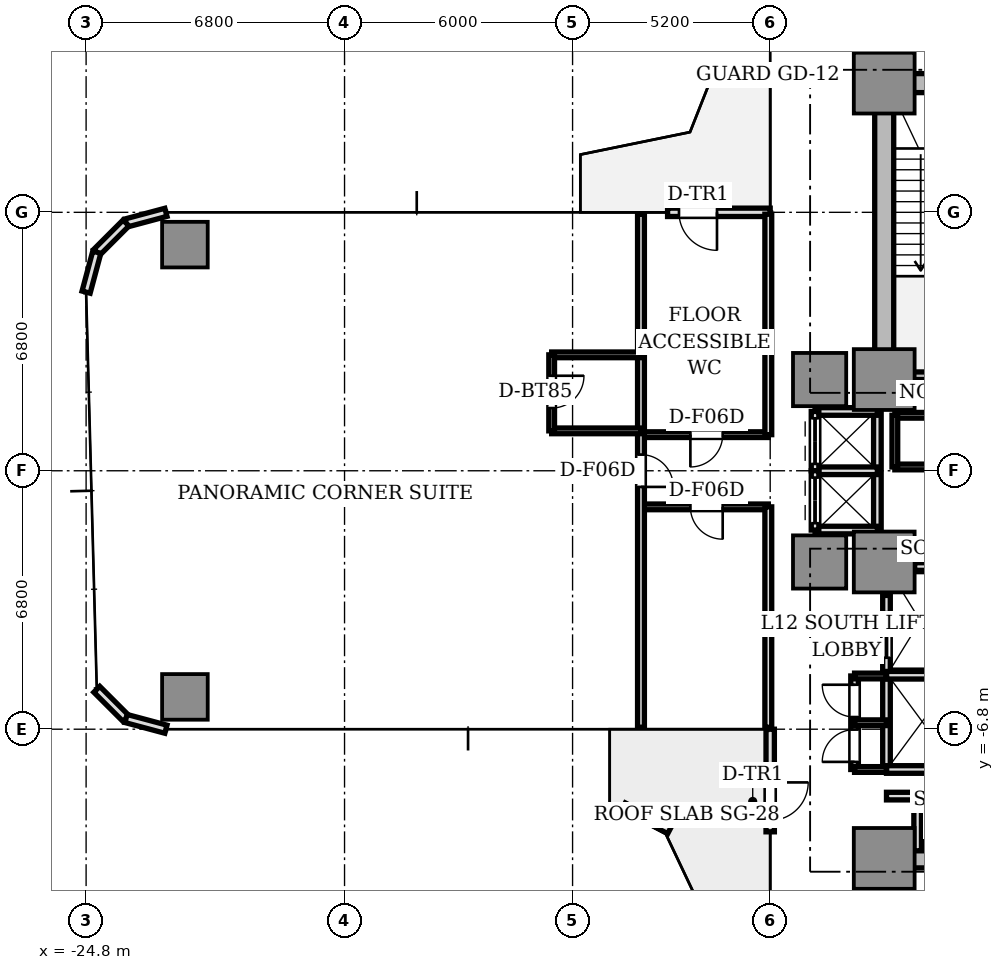
"""IFC4 building model, lengths in metres.
Left out: names, types, materials, properties, quantities, classifications, styles, units other than length and angle.
Written with IfcOpenShell. Run it as: python <this file> out.ifc"""

import sys

from ifc_helpers import new_model, si_unit, direction, frame, frame_2d, origin, origin_2d, place, context, subcontext, project, spatial, rectangle, extrude, source, transform, mapped, element, fill, save


model = new_model("IFC4")
c1 = context("Model", 3, precision=1e-05, world=origin(), true_north=direction((0.0, 1.0)))
c2 = subcontext(c1, "Body", "Model", "MODEL_VIEW")
j1 = project(units=[si_unit("LENGTHUNIT", "METRE"), si_unit("PLANEANGLEUNIT", "RADIAN")], contexts=[c1])
p1 = place(None, origin())
s1 = spatial("IfcSite", under=j1, at=p1, CompositionType="ELEMENT")
p2 = place(p1, origin())
s2 = spatial("IfcBuilding", under=s1, at=p2, CompositionType="ELEMENT")
p3 = place(p2, frame((0.0, 0.0, 46.55)))
s3 = spatial("IfcBuildingStorey", under=s2, at=p3, CompositionType="ELEMENT", Elevation=46.55)
p4 = place(p3, frame((-3.55, 10.2, 0.0), z_axis=(0.0, 0.0, 1.0), x_axis=(1.0, 0.0, 0.0)))
e1 = element("IfcWall", 1, at=p4, inside=s3, PredefinedType="SHEAR", context=c2, shape_type="SweptSolid", body=[
    extrude(rectangle(XDim=7.1, YDim=0.5, at=frame_2d((3.55, 0.0))), origin(), (0.0, 0.0, 1.0), 4.26),
])
p5 = place(p3, frame((-3.8, 2.85, 0.0), z_axis=(0.0, 0.0, 1.0), x_axis=(0.0, 1.0, 0.0)))
e2 = element("IfcWall", 2, at=p5, inside=s3, PredefinedType="SHEAR", context=c2, shape_type="SweptSolid", body=[
    extrude(rectangle(XDim=6.9, YDim=0.5, at=frame_2d((3.45, 0.0))), origin(), (0.0, 0.0, 1.0), 4.26),
])
p6 = place(p3, frame((-3.55, -10.2, 0.0), z_axis=(0.0, 0.0, 1.0), x_axis=(1.0, 0.0, 0.0)))
e3 = element("IfcWall", 3, at=p6, inside=s3, PredefinedType="SHEAR", context=c2, shape_type="SweptSolid", body=[
    extrude(rectangle(XDim=7.1, YDim=0.5, at=frame_2d((3.55, 0.0))), origin(), (0.0, 0.0, 1.0), 4.26),
])
m1 = source(origin(), c2, "Body", "SweptSolid", [
    extrude(rectangle(XDim=1.6, YDim=1.6, at=origin_2d()), origin(), (0.0, 0.0, 1.0), 4.26),
])
for number, where, z_axis, x_axis in (
    (4, (-3.8, 2.4, 0.0), (0.0, 0.0, 1.0), (1.0, 0.0, 0.0)),
    (5, (-3.8, 10.2, 0.0), (0.0, 0.0, 1.0), (1.0, 0.0, 0.0)),
    (6, (-3.8, -2.4, 0.0), (0.0, 0.0, 1.0), (1.0, 0.0, 0.0)),
    (7, (-3.8, -10.2, 0.0), (0.0, 0.0, 1.0), (1.0, 0.0, 0.0)),
):
    element("IfcColumn", number, at=place(p3, frame(where, z_axis=z_axis, x_axis=x_axis)), inside=s3, PredefinedType="COLUMN", context=c2, shape_type="MappedRepresentation", body=[
        mapped(m1, transform((0.0, 0.0, 0.0), scale=1.0)),
    ])
m2 = source(origin(), c2, "Body", "SweptSolid", [
    extrude(rectangle(XDim=1.4, YDim=1.4, at=origin_2d()), origin(), (0.0, 0.0, 1.0), 4.26),
])
for number, where, z_axis, x_axis in (
    (8, (-5.5, 2.4, 0.0), (0.0, 0.0, 1.0), (1.0, 0.0, 0.0)),
    (9, (-5.5, -2.4, 0.0), (0.0, 0.0, 1.0), (1.0, 0.0, 0.0)),
):
    element("IfcColumn", number, at=place(p3, frame(where, z_axis=z_axis, x_axis=x_axis)), inside=s3, PredefinedType="COLUMN", context=c2, shape_type="MappedRepresentation", body=[
        mapped(m2, transform((0.0, 0.0, 0.0), scale=1.0)),
    ])
m3 = source(origin(), c2, "Body", "SweptSolid", [
    extrude(rectangle(XDim=1.2, YDim=1.2, at=origin_2d()), origin(), (0.0, 0.0, 1.0), 4.26),
])
for number, where, z_axis, x_axis in (
    (10, (-22.2, 5.95, 0.0), (0.0, 0.0, 1.0), (1.0, 0.0, 0.0)),
    (11, (-22.2, -5.95, 0.0), (0.0, 0.0, 1.0), (1.0, 0.0, 0.0)),
):
    element("IfcColumn", number, at=place(p3, frame(where, z_axis=z_axis, x_axis=x_axis)), inside=s3, PredefinedType="COLUMN", context=c2, shape_type="MappedRepresentation", body=[
        mapped(m3, transform((0.0, 0.0, 0.0), scale=1.0)),
    ])
p7 = place(p3, frame((-6.8, 6.8, 0.0), z_axis=(0.0, 0.0, 1.0), x_axis=(-1.0, 0.0, 0.0)))
e12 = element("IfcWall", 12, at=p7, inside=s3, PredefinedType="STANDARD", context=c2, shape_type="SweptSolid", body=[
    extrude(rectangle(XDim=2.7, YDim=0.22, at=frame_2d((1.35, 0.0))), origin(), (0.0, 0.0, 1.0), 4.26),
])
p8 = place(p7, frame((1.4, 0.0, 0.0)))
e13 = element("IfcOpeningElement", 13, at=p8, cuts=e12, PredefinedType="OPENING", context=c2, shape_type="SweptSolid", body=[
    extrude(rectangle(XDim=1.0, YDim=2.2, at=frame_2d((0.5, 1.1))), frame((0.0, 0.12, 0.0), z_axis=(0.0, -1.0, 0.0), x_axis=(1.0, 0.0, 0.0)), (0.0, 0.0, 1.0), 0.24),
])
for number, where, z_axis, x_axis in (
    (14, (-22.7, 6.8, 0.0), (0.0, 0.0, 1.0), (-0.966, -0.259, 0.0)),
    (15, (-23.75, 6.519, 0.0), (0.0, 0.0, 1.0), (-0.707, -0.707, 0.0)),
    (16, (-24.519, 5.75, 0.0), (0.0, 0.0, 1.0), (-0.259, -0.966, 0.0)),
    (17, (-24.519, -5.75, 0.0), (0.0, 0.0, 1.0), (0.707, -0.707, 0.0)),
    (18, (-23.75, -6.519, 0.0), (0.0, 0.0, 1.0), (0.966, -0.259, 0.0)),
):
    element("IfcWall", number, at=place(p3, frame(where, z_axis=z_axis, x_axis=x_axis)), inside=s3, PredefinedType="STANDARD", context=c2, shape_type="SweptSolid", body=[
        extrude(rectangle(XDim=1.087, YDim=0.22, at=frame_2d((0.543, 0.0))), origin(), (0.0, 0.0, 1.0), 4.26),
    ])
p9 = place(p3, frame((-6.8, -6.8, 0.0), z_axis=(0.0, 0.0, 1.0), x_axis=(0.0, -1.0, 0.0)))
e19 = element("IfcWall", 19, at=p9, inside=s3, PredefinedType="STANDARD", context=c2, shape_type="SweptSolid", body=[
    extrude(rectangle(XDim=2.7, YDim=0.22, at=frame_2d((1.35, 0.0))), origin(), (0.0, 0.0, 1.0), 4.26),
])
p10 = place(p9, frame((1.4, 0.0, 0.0)))
e20 = element("IfcOpeningElement", 20, at=p10, cuts=e19, PredefinedType="OPENING", context=c2, shape_type="SweptSolid", body=[
    extrude(rectangle(XDim=1.0, YDim=2.2, at=frame_2d((0.5, 1.1))), frame((0.0, 0.12, 0.0), z_axis=(0.0, -1.0, 0.0), x_axis=(1.0, 0.0, 0.0)), (0.0, 0.0, 1.0), 0.24),
])
p11 = place(p3, frame((-10.658, -8.828, 0.0), z_axis=(0.0, 0.0, 1.0), x_axis=(0.886258866685, -0.463190264602, 0.0)))
e21 = element("IfcWall", 21, at=p11, inside=s3, PredefinedType="PARAPET", context=c2, shape_type="SweptSolid", body=[
    extrude(rectangle(XDim=1.363, YDim=0.2, at=frame_2d((0.682, 0.0))), origin(), (0.0, 0.0, 1.0), 0.65),
])
p12 = place(p3, frame((-3.72, 2.5, 0.0), z_axis=(0.0, 0.0, 1.0), x_axis=(1.0, 0.0, 0.0)))
e22 = element("IfcWall", 22, at=p12, inside=s3, PredefinedType="SOLIDWALL", context=c2, shape_type="SweptSolid", body=[
    extrude(rectangle(XDim=3.72, YDim=0.2, at=frame_2d((1.86, 0.0))), origin(), (0.0, 0.0, 1.0), 4.26),
])
p13 = place(p3, frame((-3.0, -2.52, 0.0), z_axis=(0.0, 0.0, 1.0), x_axis=(1.0, 0.0, 0.0)))
e23 = element("IfcWall", 23, at=p13, inside=s3, PredefinedType="SOLIDWALL", context=c2, shape_type="SweptSolid", body=[
    extrude(rectangle(XDim=1.0, YDim=0.2, at=frame_2d((0.5, 0.0))), origin(), (0.0, 0.0, 1.0), 3.81),
])
p14 = place(p3, frame((-3.74, -5.36, 0.0), z_axis=(0.0, 0.0, 1.0), x_axis=(0.0, 1.0, 0.0)))
e24 = element("IfcWall", 24, at=p14, inside=s3, PredefinedType="SOLIDWALL", context=c2, shape_type="SweptSolid", body=[
    extrude(rectangle(XDim=2.08, YDim=0.2, at=frame_2d((1.04, 0.0))), origin(), (0.0, 0.0, 1.0), 3.81),
])
p15 = place(p14, frame((0.44, 0.0, 0.0)))
e25 = element("IfcOpeningElement", 25, at=p15, cuts=e24, PredefinedType="OPENING", context=c2, shape_type="SweptSolid", body=[
    extrude(rectangle(XDim=1.2, YDim=2.2, at=frame_2d((0.6, 1.1))), frame((0.0, 0.11, 0.0), z_axis=(0.0, -1.0, 0.0), x_axis=(1.0, 0.0, 0.0)), (0.0, 0.0, 1.0), 0.22),
])
p16 = place(p3, frame((-3.74, -7.86, 0.0), z_axis=(0.0, 0.0, 1.0), x_axis=(0.0, 1.0, 0.0)))
e26 = element("IfcWall", 26, at=p16, inside=s3, PredefinedType="SOLIDWALL", context=c2, shape_type="SweptSolid", body=[
    extrude(rectangle(XDim=2.48, YDim=0.2, at=frame_2d((1.24, 0.0))), origin(), (0.0, 0.0, 1.0), 3.81),
])
p17 = place(p3, frame((-3.74, -7.86, 0.0), z_axis=(0.0, 0.0, 1.0), x_axis=(1.0, 0.0, 0.0)))
e27 = element("IfcWall", 27, at=p17, inside=s3, PredefinedType="SOLIDWALL", context=c2, shape_type="SweptSolid", body=[
    extrude(rectangle(XDim=1.84, YDim=0.2, at=frame_2d((0.92, 0.0))), origin(), (0.0, 0.0, 1.0), 3.81),
])
p18 = place(p3, frame((-3.74, -5.38, 0.0), z_axis=(0.0, 0.0, 1.0), x_axis=(1.0, 0.0, 0.0)))
e28 = element("IfcWall", 28, at=p18, inside=s3, PredefinedType="SOLIDWALL", context=c2, shape_type="SweptSolid", body=[
    extrude(rectangle(XDim=3.69, YDim=0.2, at=frame_2d((1.845, 0.0))), origin(), (0.0, 0.0, 1.0), 3.81),
])
p19 = place(p3, frame((-3.98, -1.56, 0.0), z_axis=(0.0, 0.0, 1.0), x_axis=(0.0, 1.0, 0.0)))
e29 = element("IfcWall", 29, at=p19, inside=s3, PredefinedType="SOLIDWALL", context=c2, shape_type="SweptSolid", body=[
    extrude(rectangle(XDim=3.12, YDim=0.2, at=frame_2d((1.56, 0.0))), origin(), (0.0, 0.0, 1.0), 3.33),
])
for number, where, z_axis, x_axis in (
    (30, (-5.62, 1.56, 0.0), (0.0, 0.0, 1.0), (1.0, 0.0, 0.0)),
    (31, (-5.62, -1.56, 0.0), (0.0, 0.0, 1.0), (1.0, 0.0, 0.0)),
    (32, (-5.62, 0.0, 0.0), (0.0, 0.0, 1.0), (1.0, 0.0, 0.0)),
):
    element("IfcWall", number, at=place(p3, frame(where, z_axis=z_axis, x_axis=x_axis)), inside=s3, PredefinedType="SOLIDWALL", context=c2, shape_type="SweptSolid", body=[
        extrude(rectangle(XDim=1.64, YDim=0.2, at=frame_2d((0.82, 0.0))), origin(), (0.0, 0.0, 1.0), 3.81),
    ])
p20 = place(p3, frame((-5.62, 0.0, 0.0), z_axis=(0.0, 0.0, 1.0), x_axis=(0.0, 1.0, 0.0)))
e33 = element("IfcWall", 33, at=p20, inside=s3, PredefinedType="SOLIDWALL", context=c2, shape_type="SweptSolid", body=[
    extrude(rectangle(XDim=1.56, YDim=0.2, at=frame_2d((0.78, 0.0))), origin(), (0.0, 0.0, 1.0), 3.81),
])
p21 = place(p20, frame((0.18, 0.0, 0.0)))
e34 = element("IfcOpeningElement", 34, at=p21, cuts=e33, PredefinedType="OPENING", context=c2, shape_type="SweptSolid", body=[
    extrude(rectangle(XDim=1.2, YDim=2.2, at=frame_2d((0.6, 1.1))), frame((0.0, 0.11, 0.0), z_axis=(0.0, -1.0, 0.0), x_axis=(1.0, 0.0, 0.0)), (0.0, 0.0, 1.0), 0.22),
])
p22 = place(p3, frame((-5.62, -1.56, 0.0), z_axis=(0.0, 0.0, 1.0), x_axis=(0.0, 1.0, 0.0)))
e35 = element("IfcWall", 35, at=p22, inside=s3, PredefinedType="SOLIDWALL", context=c2, shape_type="SweptSolid", body=[
    extrude(rectangle(XDim=1.56, YDim=0.2, at=frame_2d((0.78, 0.0))), origin(), (0.0, 0.0, 1.0), 3.81),
])
p23 = place(p22, frame((0.18, 0.0, 0.0)))
e36 = element("IfcOpeningElement", 36, at=p23, cuts=e35, PredefinedType="OPENING", context=c2, shape_type="SweptSolid", body=[
    extrude(rectangle(XDim=1.2, YDim=2.2, at=frame_2d((0.6, 1.1))), frame((0.0, 0.11, 0.0), z_axis=(0.0, -1.0, 0.0), x_axis=(1.0, 0.0, 0.0)), (0.0, 0.0, 1.0), 0.22),
])
p24 = place(p3, frame((-3.74, -8.56, 0.0), z_axis=(0.0, 0.0, 1.0), x_axis=(1.0, 0.0, 0.0)))
e37 = element("IfcWall", 37, at=p24, inside=s3, PredefinedType="SOLIDWALL", context=c2, shape_type="SweptSolid", body=[
    extrude(rectangle(XDim=3.62, YDim=0.2, at=frame_2d((1.81, 0.0))), origin(), (0.0, 0.0, 1.0), 3.81),
])
p25 = place(p24, frame((1.15, 0.0, 0.0)))
e38 = element("IfcOpeningElement", 38, at=p25, cuts=e37, PredefinedType="OPENING", context=c2, shape_type="SweptSolid", body=[
    extrude(rectangle(XDim=0.85, YDim=2.1, at=frame_2d((0.425, 1.05))), frame((0.0, 0.11, 0.0), z_axis=(0.0, -1.0, 0.0), x_axis=(1.0, 0.0, 0.0)), (0.0, 0.0, 1.0), 0.22),
])
p26 = place(p3, frame((-2.92, -10.0, 0.0), z_axis=(0.0, 0.0, 1.0), x_axis=(0.0, 1.0, 0.0)))
e39 = element("IfcWall", 39, at=p26, inside=s3, PredefinedType="SOLIDWALL", context=c2, shape_type="SweptSolid", body=[
    extrude(rectangle(XDim=1.44, YDim=0.2, at=frame_2d((0.72, 0.0))), origin(), (0.0, 0.0, 1.0), 3.81),
])
p27 = place(p3, frame((-4.58, -7.86, 0.0), z_axis=(0.0, 0.0, 1.0), x_axis=(0.0, 1.0, 0.0)))
e40 = element("IfcWall", 40, at=p27, inside=s3, PredefinedType="SOLIDWALL", context=c2, shape_type="SweptSolid", body=[
    extrude(rectangle(XDim=2.46, YDim=0.2, at=frame_2d((1.23, 0.0))), origin(), (0.0, 0.0, 1.0), 3.81),
])
p28 = place(p27, frame((0.2, 0.0, 0.0)))
e41 = element("IfcOpeningElement", 41, at=p28, cuts=e40, PredefinedType="OPENING", context=c2, shape_type="SweptSolid", body=[
    extrude(rectangle(XDim=0.85, YDim=2.1, at=frame_2d((0.425, 1.05))), frame((0.0, 0.11, 0.0), z_axis=(0.0, -1.0, 0.0), x_axis=(1.0, 0.0, 0.0)), (0.0, 0.0, 1.0), 0.22),
])
p29 = place(p27, frame((1.38, 0.0, 0.0)))
e42 = element("IfcOpeningElement", 42, at=p29, cuts=e40, PredefinedType="OPENING", context=c2, shape_type="SweptSolid", body=[
    extrude(rectangle(XDim=0.85, YDim=2.1, at=frame_2d((0.425, 1.05))), frame((0.0, 0.11, 0.0), z_axis=(0.0, -1.0, 0.0), x_axis=(1.0, 0.0, 0.0)), (0.0, 0.0, 1.0), 0.22),
])
for number, where, z_axis, x_axis in (
    (43, (-4.58, -5.4, 0.0), (0.0, 0.0, 1.0), (1.0, 0.0, 0.0)),
    (44, (-4.58, -7.86, 0.0), (0.0, 0.0, 1.0), (1.0, 0.0, 0.0)),
    (45, (-4.58, -6.63, 0.0), (0.0, 0.0, 1.0), (1.0, 0.0, 0.0)),
):
    element("IfcWall", number, at=place(p3, frame(where, z_axis=z_axis, x_axis=x_axis)), inside=s3, PredefinedType="PARTITIONING", context=c2, shape_type="SweptSolid", body=[
        extrude(rectangle(XDim=0.84, YDim=0.15, at=frame_2d((0.42, 0.0))), origin(), (0.0, 0.0, 1.0), 3.81),
    ])
p30 = place(p3, frame((-3.52, 0.1, 0.0), z_axis=(0.0, 0.0, 1.0), x_axis=(1.0, 0.0, 0.0)))
e46 = element("IfcWall", 46, at=p30, inside=s3, PredefinedType="PARTITIONING", context=c2, shape_type="SweptSolid", body=[
    extrude(rectangle(XDim=3.14, YDim=0.15, at=frame_2d((1.57, 0.0))), origin(), (0.0, 0.0, 1.0), 3.81),
])
p31 = place(p3, frame((-3.52, 1.46, 0.0), z_axis=(0.0, 0.0, 1.0), x_axis=(1.0, 0.0, 0.0)))
e47 = element("IfcWall", 47, at=p31, inside=s3, PredefinedType="PARTITIONING", context=c2, shape_type="SweptSolid", body=[
    extrude(rectangle(XDim=3.14, YDim=0.15, at=frame_2d((1.57, 0.0))), origin(), (0.0, 0.0, 1.0), 3.81),
])
p32 = place(p31, frame((1.05, 0.0, 0.0)))
e48 = element("IfcOpeningElement", 48, at=p32, cuts=e47, PredefinedType="OPENING", context=c2, shape_type="SweptSolid", body=[
    extrude(rectangle(XDim=0.85, YDim=2.1, at=frame_2d((0.425, 1.05))), frame((0.0, 0.085, 0.0), z_axis=(0.0, -1.0, 0.0), x_axis=(1.0, 0.0, 0.0)), (0.0, 0.0, 1.0), 0.17),
])
p33 = place(p3, frame((-3.52, 0.1, 0.0), z_axis=(0.0, 0.0, 1.0), x_axis=(0.0, 1.0, 0.0)))
e49 = element("IfcWall", 49, at=p33, inside=s3, PredefinedType="PARTITIONING", context=c2, shape_type="SweptSolid", body=[
    extrude(rectangle(XDim=1.36, YDim=0.15, at=frame_2d((0.68, 0.0))), origin(), (0.0, 0.0, 1.0), 3.33),
])
p34 = place(p3, frame((-6.85, -0.95, 0.0), z_axis=(0.0, 0.0, 1.0), x_axis=(-1.0, 0.0, 0.0)))
e50 = element("IfcWall", 50, at=p34, inside=s3, PredefinedType="PARTITIONING", context=c2, shape_type="SweptSolid", body=[
    extrude(rectangle(XDim=3.35, YDim=0.15, at=frame_2d((1.675, 0.0))), origin(), (0.0, 0.0, 1.0), 3.81),
])
p35 = place(p34, frame((1.2, 0.0, 0.0)))
e51 = element("IfcOpeningElement", 51, at=p35, cuts=e50, PredefinedType="OPENING", context=c2, shape_type="SweptSolid", body=[
    extrude(rectangle(XDim=0.85, YDim=2.1, at=frame_2d((0.425, 1.05))), frame((0.0, 0.085, 0.0), z_axis=(0.0, -1.0, 0.0), x_axis=(1.0, 0.0, 0.0)), (0.0, 0.0, 1.0), 0.17),
])
p36 = place(p3, frame((-6.85, 0.95, 0.0), z_axis=(0.0, 0.0, 1.0), x_axis=(-1.0, 0.0, 0.0)))
e52 = element("IfcWall", 52, at=p36, inside=s3, PredefinedType="PARTITIONING", context=c2, shape_type="SweptSolid", body=[
    extrude(rectangle(XDim=3.35, YDim=0.15, at=frame_2d((1.675, 0.0))), origin(), (0.0, 0.0, 1.0), 3.81),
])
p37 = place(p36, frame((1.2, 0.0, 0.0)))
e53 = element("IfcOpeningElement", 53, at=p37, cuts=e52, PredefinedType="OPENING", context=c2, shape_type="SweptSolid", body=[
    extrude(rectangle(XDim=0.85, YDim=2.1, at=frame_2d((0.425, 1.05))), frame((0.0, 0.085, 0.0), z_axis=(0.0, -1.0, 0.0), x_axis=(1.0, 0.0, 0.0)), (0.0, 0.0, 1.0), 0.17),
])
for number, where, z_axis, x_axis in (
    (54, (-6.85, -0.95, 0.0), (0.0, 0.0, 1.0), (0.0, -1.0, 0.0)),
    (55, (-6.85, 6.75, 0.0), (0.0, 0.0, 1.0), (0.0, -1.0, 0.0)),
):
    element("IfcWall", number, at=place(p3, frame(where, z_axis=z_axis, x_axis=x_axis)), inside=s3, PredefinedType="PARTITIONING", context=c2, shape_type="SweptSolid", body=[
        extrude(rectangle(XDim=5.8, YDim=0.18, at=frame_2d((2.9, 0.0))), origin(), (0.0, 0.0, 1.0), 3.81),
    ])
p38 = place(p3, frame((-10.2, 6.75, 0.0), z_axis=(0.0, 0.0, 1.0), x_axis=(0.0, -1.0, 0.0)))
e56 = element("IfcWall", 56, at=p38, inside=s3, PredefinedType="PARTITIONING", context=c2, shape_type="SweptSolid", body=[
    extrude(rectangle(XDim=13.5, YDim=0.18, at=frame_2d((6.75, 0.0))), origin(), (0.0, 0.0, 1.0), 3.78),
])
p39 = place(p38, frame((6.325, 0.0, 0.0)))
e57 = element("IfcOpeningElement", 57, at=p39, cuts=e56, PredefinedType="OPENING", context=c2, shape_type="SweptSolid", body=[
    extrude(rectangle(XDim=0.85, YDim=2.1, at=frame_2d((0.425, 1.05))), frame((0.0, 0.1, 0.0), z_axis=(0.0, -1.0, 0.0), x_axis=(1.0, 0.0, 0.0)), (0.0, 0.0, 1.0), 0.2),
])
p40 = place(p3, frame((-10.2, 1.05, 0.0), z_axis=(0.0, 0.0, 1.0), x_axis=(-1.0, 0.0, 0.0)))
e58 = element("IfcWall", 58, at=p40, inside=s3, PredefinedType="PARTITIONING", context=c2, shape_type="SweptSolid", body=[
    extrude(rectangle(XDim=2.35, YDim=0.15, at=frame_2d((1.175, 0.0))), origin(), (0.0, 0.0, 1.0), 3.81),
])
p41 = place(p3, frame((-10.2, 3.05, 0.0), z_axis=(0.0, 0.0, 1.0), x_axis=(-1.0, 0.0, 0.0)))
e59 = element("IfcWall", 59, at=p41, inside=s3, PredefinedType="PARTITIONING", context=c2, shape_type="SweptSolid", body=[
    extrude(rectangle(XDim=2.35, YDim=0.15, at=frame_2d((1.175, 0.0))), origin(), (0.0, 0.0, 1.0), 3.78),
])
p42 = place(p3, frame((-12.55, 3.05, 0.0), z_axis=(0.0, 0.0, 1.0), x_axis=(0.0, -1.0, 0.0)))
e60 = element("IfcWall", 60, at=p42, inside=s3, PredefinedType="PARTITIONING", context=c2, shape_type="SweptSolid", body=[
    extrude(rectangle(XDim=2.0, YDim=0.15, at=frame_2d((1.0, 0.0))), origin(), (0.0, 0.0, 1.0), 3.81),
])
p43 = place(p42, frame((0.55, 0.0, 0.0)))
e61 = element("IfcOpeningElement", 61, at=p43, cuts=e60, PredefinedType="OPENING", context=c2, shape_type="SweptSolid", body=[
    extrude(rectangle(XDim=0.85, YDim=2.1, at=frame_2d((0.425, 1.05))), frame((0.0, 0.085, 0.0), z_axis=(0.0, -1.0, 0.0), x_axis=(1.0, 0.0, 0.0)), (0.0, 0.0, 1.0), 0.17),
])
m4 = source(origin(), c2, "Body", "SweptSolid", [
    extrude(rectangle(XDim=1.0, YDim=0.05, at=origin_2d()), origin(), (0.0, 0.0, 1.0), 2.2),
])
p44 = place(p8, frame((0.5, 0.0, 0.0)))
e62 = element("IfcDoor", 62, at=p44, inside=s3, OperationType="SINGLE_SWING_LEFT", PredefinedType="DOOR", context=c2, shape_type="MappedRepresentation", body=[
    mapped(m4, transform((0.0, 0.0, 0.0), scale=1.0)),
])
fill(e13, e62)
p45 = place(p10, frame((0.5, 0.0, 0.0)))
e63 = element("IfcDoor", 63, at=p45, inside=s3, OperationType="SINGLE_SWING_LEFT", PredefinedType="DOOR", context=c2, shape_type="MappedRepresentation", body=[
    mapped(m4, transform((0.0, 0.0, 0.0), scale=1.0)),
])
fill(e20, e63)
m5 = source(origin(), c2, "Body", "SweptSolid", [
    extrude(rectangle(XDim=1.2, YDim=0.05, at=origin_2d()), origin(), (0.0, 0.0, 1.0), 2.2),
])
p46 = place(p15, frame((0.6, 0.0, 0.0)))
e64 = element("IfcDoor", 64, at=p46, inside=s3, OperationType="DOUBLE_DOOR_SLIDING", PredefinedType="DOOR", context=c2, shape_type="MappedRepresentation", body=[
    mapped(m5, transform((0.0, 0.0, 0.0), scale=1.0)),
])
fill(e25, e64)
p47 = place(p21, frame((0.6, 0.0, 0.0)))
e65 = element("IfcDoor", 65, at=p47, inside=s3, OperationType="DOUBLE_DOOR_SLIDING", PredefinedType="DOOR", context=c2, shape_type="MappedRepresentation", body=[
    mapped(m5, transform((0.0, 0.0, 0.0), scale=1.0)),
])
fill(e34, e65)
p48 = place(p23, frame((0.6, 0.0, 0.0)))
e66 = element("IfcDoor", 66, at=p48, inside=s3, OperationType="DOUBLE_DOOR_SLIDING", PredefinedType="DOOR", context=c2, shape_type="MappedRepresentation", body=[
    mapped(m5, transform((0.0, 0.0, 0.0), scale=1.0)),
])
fill(e36, e66)
m6 = source(origin(), c2, "Body", "SweptSolid", [
    extrude(rectangle(XDim=0.85, YDim=0.05, at=origin_2d()), origin(), (0.0, 0.0, 1.0), 2.1),
])
p49 = place(p28, frame((0.425, 0.0, 0.0)))
e67 = element("IfcDoor", 67, at=p49, inside=s3, OperationType="SINGLE_SWING_LEFT", PredefinedType="DOOR", context=c2, shape_type="MappedRepresentation", body=[
    mapped(m6, transform((0.0, 0.0, 0.0), scale=1.0)),
])
fill(e41, e67)
p50 = place(p29, frame((0.425, 0.0, 0.0)))
e68 = element("IfcDoor", 68, at=p50, inside=s3, OperationType="SINGLE_SWING_RIGHT", PredefinedType="DOOR", context=c2, shape_type="MappedRepresentation", body=[
    mapped(m6, transform((0.0, 0.0, 0.0), scale=1.0)),
])
fill(e42, e68)
p51 = place(p35, frame((0.425, 0.0, 0.0)))
e69 = element("IfcDoor", 69, at=p51, inside=s3, OperationType="SINGLE_SWING_LEFT", PredefinedType="DOOR", context=c2, shape_type="MappedRepresentation", body=[
    mapped(m6, transform((0.0, 0.0, 0.0), scale=1.0)),
])
fill(e51, e69)
p52 = place(p37, frame((0.425, 0.0, 0.0)))
e70 = element("IfcDoor", 70, at=p52, inside=s3, OperationType="SINGLE_SWING_RIGHT", PredefinedType="DOOR", context=c2, shape_type="MappedRepresentation", body=[
    mapped(m6, transform((0.0, 0.0, 0.0), scale=1.0)),
])
fill(e53, e70)
p53 = place(p43, frame((0.425, 0.0, 0.0)))
e71 = element("IfcDoor", 71, at=p53, inside=s3, OperationType="SINGLE_SWING_LEFT", PredefinedType="DOOR", context=c2, shape_type="MappedRepresentation", body=[
    mapped(m6, transform((0.0, 0.0, 0.0), scale=1.0)),
])
fill(e61, e71)
p54 = place(p39, frame((0.425, 0.0, 0.0)))
e72 = element("IfcDoor", 72, at=p54, inside=s3, OperationType="SINGLE_SWING_RIGHT", PredefinedType="DOOR", context=c2, shape_type="MappedRepresentation", body=[
    mapped(m6, transform((0.0, 0.0, 0.0), scale=1.0)),
])
fill(e57, e72)
save(model, sys.argv[1])
